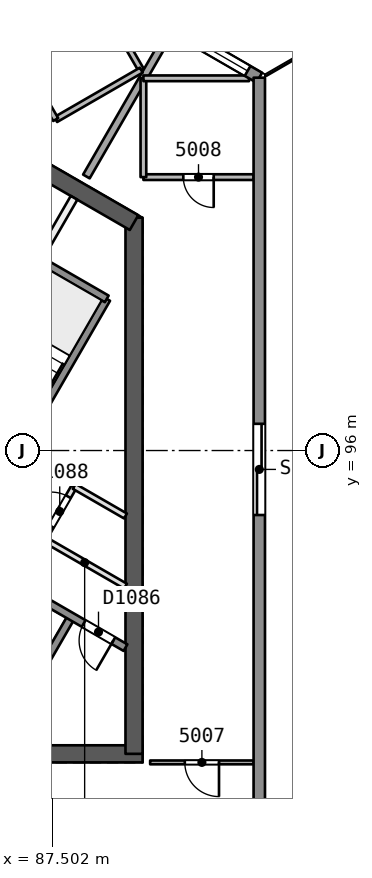
"""IFC4 building model, lengths in metres.
Left out: names, types, materials, properties, quantities, classifications, styles, units other than length and angle.
Written with IfcOpenShell. Run it as: python <this file> out.ifc"""

import sys

from ifc_helpers import new_model, si_unit, direction, frame, frame_2d, origin, place, context, subcontext, project, spatial, rectangle, extrude, element, fill, save


model = new_model("IFC4")
c1 = context("Model", 3, precision=1e-05, world=origin(), true_north=direction((0.0, 1.0)))
c2 = subcontext(c1, "Body", "Model", "MODEL_VIEW")
j1 = project(units=[si_unit("LENGTHUNIT", "METRE"), si_unit("PLANEANGLEUNIT", "RADIAN")], contexts=[c1])
p1 = place(None, origin())
s1 = spatial("IfcSite", under=j1, at=p1, CompositionType="ELEMENT")
p2 = place(p1, origin())
s2 = spatial("IfcBuilding", under=s1, at=p2, CompositionType="ELEMENT")
p3 = place(p2, frame((0.0, 0.0, 205.8)))
s3 = spatial("IfcBuildingStorey", under=s2, at=p3, CompositionType="ELEMENT", Elevation=205.8)
p4 = place(p3, frame((79.63, 88.019, 0.0), z_axis=(0.0, 0.0, 1.0), x_axis=(1.0, 0.0, 0.0)))
e1 = element("IfcWall", 1, at=p4, inside=s3, PredefinedType="SHEAR", context=c2, shape_type="SweptSolid", body=[
    extrude(rectangle(XDim=10.25, YDim=0.45, at=frame_2d((5.125, 0.0))), origin(), (0.0, 0.0, 1.0), 3.7),
])
p5 = place(p4, frame((0.82, 0.0, 0.0)))
e2 = element("IfcOpeningElement", 2, at=p5, cuts=e1, PredefinedType="OPENING", context=c2, shape_type="SweptSolid", body=[
    extrude(rectangle(XDim=1.2, YDim=2.1, at=frame_2d((0.6, 1.05))), frame((0.0, 0.235, 0.0), z_axis=(0.0, -1.0, 0.0), x_axis=(1.0, 0.0, 0.0)), (0.0, 0.0, 1.0), 0.471),
])
p6 = place(p3, frame((89.655, 88.019, 0.0), z_axis=(0.0, 0.0, 1.0), x_axis=(0.0, 1.0, 0.0)))
e3 = element("IfcWall", 3, at=p6, inside=s3, PredefinedType="SHEAR", context=c2, shape_type="SweptSolid", body=[
    extrude(rectangle(XDim=14.108, YDim=0.45, at=frame_2d((7.054, 0.0))), origin(), (0.0, 0.0, 1.0), 3.7),
])
p7 = place(p3, frame((89.655, 101.998, 0.0), z_axis=(0.0, 0.0, 1.0), x_axis=(-0.866042179588, 0.49997094233, 0.0)))
e4 = element("IfcWall", 4, at=p7, inside=s3, PredefinedType="SHEAR", context=c2, shape_type="SweptSolid", body=[
    extrude(rectangle(XDim=3.515, YDim=0.45, at=frame_2d((1.758, 0.0))), origin(), (0.0, 0.0, 1.0), 3.7),
])
p8 = place(p3, frame((92.802, 87.794, 0.0), z_axis=(0.0, 0.0, 1.0), x_axis=(-1.0, 0.0, 0.0)))
e5 = element("IfcWall", 5, at=p8, inside=s3, PredefinedType="PARTITIONING", context=c2, shape_type="SweptSolid", body=[
    extrude(rectangle(XDim=2.723, YDim=0.1, at=frame_2d((1.361, 0.0))), origin(), (0.0, 0.0, 1.0), 3.3),
])
p9 = place(p8, frame((0.911, 0.0, 0.0)))
e6 = element("IfcOpeningElement", 6, at=p9, cuts=e5, PredefinedType="OPENING", context=c2, shape_type="SweptSolid", body=[
    extrude(rectangle(XDim=0.9, YDim=2.1, at=frame_2d((0.45, 1.05))), frame((0.0, 0.061, 0.0), z_axis=(0.0, -1.0, 0.0), x_axis=(1.0, 0.0, 0.0)), (0.0, 0.0, 1.0), 0.121),
])
p10 = place(p3, frame((92.802, 103.194, 0.0), z_axis=(0.0, 0.0, 1.0), x_axis=(-1.0, 0.0, 0.0)))
e7 = element("IfcWall", 7, at=p10, inside=s3, PredefinedType="PARTITIONING", context=c2, shape_type="SweptSolid", body=[
    extrude(rectangle(XDim=2.9, YDim=0.15, at=frame_2d((1.45, 0.0))), origin(), (0.0, 0.0, 1.0), 3.3),
])
p11 = place(p10, frame((1.05, 0.0, 0.0)))
e8 = element("IfcOpeningElement", 8, at=p11, cuts=e7, PredefinedType="OPENING", context=c2, shape_type="SweptSolid", body=[
    extrude(rectangle(XDim=0.8, YDim=2.1, at=frame_2d((0.4, 1.05))), frame((0.0, 0.085, 0.0), z_axis=(0.0, -1.0, 0.0), x_axis=(1.0, 0.0, 0.0)), (0.0, 0.0, 1.0), 0.171),
])
p12 = place(p3, frame((89.902, 103.194, 0.0), z_axis=(0.0, 0.0, 1.0), x_axis=(0.0, 1.0, 0.0)))
e9 = element("IfcWall", 9, at=p12, inside=s3, PredefinedType="PARTITIONING", context=c2, shape_type="SweptSolid", body=[
    extrude(rectangle(XDim=2.6, YDim=0.15, at=frame_2d((1.3, 0.0))), origin(), (0.0, 0.0, 1.0), 3.3),
])
p13 = place(p3, frame((89.902, 105.794, 0.0), z_axis=(0.0, 0.0, 1.0), x_axis=(1.0, 0.0, 0.0)))
e10 = element("IfcWall", 10, at=p13, inside=s3, PredefinedType="PARTITIONING", context=c2, shape_type="SweptSolid", body=[
    extrude(rectangle(XDim=2.78, YDim=0.15, at=frame_2d((1.39, 0.0))), origin(), (0.0, 0.0, 1.0), 3.3),
])
p14 = place(p3, frame((90.59, 107.002, 0.0), z_axis=(0.0, 0.0, 1.0), x_axis=(-0.500002498361, -0.86602396135, 0.0)))
e11 = element("IfcWall", 11, at=p14, inside=s3, PredefinedType="PARTITIONING", context=c2, shape_type="SweptSolid", body=[
    extrude(rectangle(XDim=4.377, YDim=0.2, at=frame_2d((2.188, 0.0))), origin(), (0.0, 0.0, 1.0), 3.3),
])
p15 = place(p3, frame((88.613, 108.143, 0.0), z_axis=(0.0, 0.0, 1.0), x_axis=(0.500028332303, -0.866009045504, 0.0)))
e12 = element("IfcWall", 12, at=p15, inside=s3, PredefinedType="PARTITIONING", context=c2, shape_type="SweptSolid", body=[
    extrude(rectangle(XDim=2.464, YDim=0.15, at=frame_2d((1.232, 0.0))), origin(), (0.0, 0.0, 1.0), 3.3),
])
p16 = place(p3, frame((89.845, 106.009, 0.0), z_axis=(0.0, 0.0, 1.0), x_axis=(-0.865997922154, -0.500047596559, 0.0)))
e13 = element("IfcWall", 13, at=p16, inside=s3, PredefinedType="PARTITIONING", context=c2, shape_type="SweptSolid", body=[
    extrude(rectangle(XDim=2.6, YDim=0.15, at=frame_2d((1.3, 0.0))), origin(), (0.0, 0.0, 1.0), 3.3),
])
p17 = place(p3, frame((87.594, 104.709, 0.0), z_axis=(0.0, 0.0, 1.0), x_axis=(-0.500077242023, 0.865980803489, 0.0)))
e14 = element("IfcWall", 14, at=p17, inside=s3, PredefinedType="PARTITIONING", context=c2, shape_type="SweptSolid", body=[
    extrude(rectangle(XDim=2.7, YDim=0.15, at=frame_2d((1.35, 0.0))), origin(), (0.0, 0.0, 1.0), 3.3),
])
p18 = place(p17, frame((0.95, 0.0, 0.0)))
e15 = element("IfcOpeningElement", 15, at=p18, cuts=e14, PredefinedType="OPENING", context=c2, shape_type="SweptSolid", body=[
    extrude(rectangle(XDim=0.8, YDim=2.1, at=frame_2d((0.4, 1.05))), frame((0.0, 0.085, 0.0), z_axis=(0.0, -1.0, 0.0), x_axis=(1.0, 0.0, 0.0)), (0.0, 0.0, 1.0), 0.171),
])
p19 = place(p3, frame((88.377, 108.451, 0.0), z_axis=(0.0, 0.0, 1.0), x_axis=(0.866015446554, -0.500017246033, 0.0)))
e16 = element("IfcWall", 16, at=p19, inside=s3, PredefinedType="SOLIDWALL", context=c2, shape_type="SweptSolid", body=[
    extrude(rectangle(XDim=5.281, YDim=0.3, at=frame_2d((2.641, 0.0))), origin(), (0.0, 0.0, 1.0), 3.3),
])
p20 = place(p19, frame((3.126, 0.0, 0.9)))
e17 = element("IfcOpeningElement", 17, at=p20, cuts=e16, PredefinedType="OPENING", context=c2, shape_type="SweptSolid", body=[
    extrude(rectangle(XDim=1.8, YDim=1.5, at=frame_2d((0.9, 0.75))), frame((0.0, 0.161, 0.0), z_axis=(0.0, -1.0, 0.0), x_axis=(1.0, 0.0, 0.0)), (0.0, 0.0, 1.0), 0.321),
])
p21 = place(p19, frame((0.372, 0.0, 0.9)))
e18 = element("IfcOpeningElement", 18, at=p21, cuts=e16, PredefinedType="OPENING", context=c2, shape_type="SweptSolid", body=[
    extrude(rectangle(XDim=1.8, YDim=1.5, at=frame_2d((0.9, 0.75))), frame((0.0, 0.161, 0.0), z_axis=(0.0, -1.0, 0.0), x_axis=(1.0, 0.0, 0.0)), (0.0, 0.0, 1.0), 0.321),
])
p22 = place(p3, frame((92.951, 105.811, 0.0), z_axis=(0.0, 0.0, 1.0), x_axis=(0.0, -1.0, 0.0)))
e19 = element("IfcWall", 19, at=p22, inside=s3, PredefinedType="SOLIDWALL", context=c2, shape_type="SweptSolid", body=[
    extrude(rectangle(XDim=51.621, YDim=0.3, at=frame_2d((25.811, 0.0))), origin(), (0.0, 0.0, 1.0), 3.3),
])
p23 = place(p22, frame((24.299, 0.0, 0.0)))
e20 = element("IfcOpeningElement", 20, at=p23, cuts=e19, PredefinedType="OPENING", context=c2, shape_type="SweptSolid", body=[
    extrude(rectangle(XDim=2.4, YDim=2.4, at=frame_2d((1.2, 1.2))), frame((0.0, 0.161, 0.0), z_axis=(0.0, -1.0, 0.0), x_axis=(1.0, 0.0, 0.0)), (0.0, 0.0, 1.0), 0.321),
])
p24 = place(p22, frame((29.287, 0.0, 0.0)))
e21 = element("IfcOpeningElement", 21, at=p24, cuts=e19, PredefinedType="OPENING", context=c2, shape_type="SweptSolid", body=[
    extrude(rectangle(XDim=2.4, YDim=2.4, at=frame_2d((1.2, 1.2))), frame((0.0, 0.161, 0.0), z_axis=(0.0, -1.0, 0.0), x_axis=(1.0, 0.0, 0.0)), (0.0, 0.0, 1.0), 0.321),
])
p25 = place(p22, frame((40.147, 0.0, 0.0)))
e22 = element("IfcOpeningElement", 22, at=p25, cuts=e19, PredefinedType="OPENING", context=c2, shape_type="SweptSolid", body=[
    extrude(rectangle(XDim=2.4, YDim=2.4, at=frame_2d((1.2, 1.2))), frame((0.0, 0.161, 0.0), z_axis=(0.0, -1.0, 0.0), x_axis=(1.0, 0.0, 0.0)), (0.0, 0.0, 1.0), 0.321),
])
p26 = place(p22, frame((19.622, 0.0, 0.0)))
e23 = element("IfcOpeningElement", 23, at=p26, cuts=e19, PredefinedType="OPENING", context=c2, shape_type="SweptSolid", body=[
    extrude(rectangle(XDim=2.4, YDim=2.4, at=frame_2d((1.2, 1.2))), frame((0.0, 0.161, 0.0), z_axis=(0.0, -1.0, 0.0), x_axis=(1.0, 0.0, 0.0)), (0.0, 0.0, 1.0), 0.321),
])
p27 = place(p22, frame((9.107, 0.0, 0.0)))
e24 = element("IfcOpeningElement", 24, at=p27, cuts=e19, PredefinedType="OPENING", context=c2, shape_type="SweptSolid", body=[
    extrude(rectangle(XDim=2.4, YDim=2.4, at=frame_2d((1.2, 1.2))), frame((0.0, 0.161, 0.0), z_axis=(0.0, -1.0, 0.0), x_axis=(1.0, 0.0, 0.0)), (0.0, 0.0, 1.0), 0.321),
])
p28 = place(p3, frame((43.672, 82.641, 0.0), z_axis=(0.0, 0.0, 1.0), x_axis=(0.866024917385, 0.500000842468, 0.0)))
e25 = element("IfcWall", 25, at=p28, inside=s3, PredefinedType="SOLIDWALL", context=c2, shape_type="SweptSolid", body=[
    extrude(rectangle(XDim=51.621, YDim=0.3, at=frame_2d((25.811, 0.0))), origin(), (0.0, 0.0, 1.0), 3.3),
])
p29 = place(p28, frame((24.611, 0.0, 0.0)))
e26 = element("IfcOpeningElement", 26, at=p29, cuts=e25, PredefinedType="OPENING", context=c2, shape_type="SweptSolid", body=[
    extrude(rectangle(XDim=2.4, YDim=2.4, at=frame_2d((1.2, 1.2))), frame((0.0, 0.161, 0.0), z_axis=(0.0, -1.0, 0.0), x_axis=(1.0, 0.0, 0.0)), (0.0, 0.0, 1.0), 0.321),
])
p30 = place(p28, frame((30.378, 0.0, 0.0)))
e27 = element("IfcOpeningElement", 27, at=p30, cuts=e25, PredefinedType="OPENING", context=c2, shape_type="SweptSolid", body=[
    extrude(rectangle(XDim=2.4, YDim=2.4, at=frame_2d((1.2, 1.2))), frame((0.0, 0.161, 0.0), z_axis=(0.0, -1.0, 0.0), x_axis=(1.0, 0.0, 0.0)), (0.0, 0.0, 1.0), 0.321),
])
p31 = place(p28, frame((40.147, 0.0, 0.0)))
e28 = element("IfcOpeningElement", 28, at=p31, cuts=e25, PredefinedType="OPENING", context=c2, shape_type="SweptSolid", body=[
    extrude(rectangle(XDim=2.4, YDim=2.4, at=frame_2d((1.2, 1.2))), frame((0.0, 0.161, 0.0), z_axis=(0.0, -1.0, 0.0), x_axis=(1.0, 0.0, 0.0)), (0.0, 0.0, 1.0), 0.321),
])
p32 = place(p28, frame((18.843, 0.0, 0.0)))
e29 = element("IfcOpeningElement", 29, at=p32, cuts=e25, PredefinedType="OPENING", context=c2, shape_type="SweptSolid", body=[
    extrude(rectangle(XDim=2.4, YDim=2.4, at=frame_2d((1.2, 1.2))), frame((0.0, 0.161, 0.0), z_axis=(0.0, -1.0, 0.0), x_axis=(1.0, 0.0, 0.0)), (0.0, 0.0, 1.0), 0.321),
])
p33 = place(p28, frame((9.107, 0.0, 0.0)))
e30 = element("IfcOpeningElement", 30, at=p33, cuts=e25, PredefinedType="OPENING", context=c2, shape_type="SweptSolid", body=[
    extrude(rectangle(XDim=2.4, YDim=2.4, at=frame_2d((1.2, 1.2))), frame((0.0, 0.161, 0.0), z_axis=(0.0, -1.0, 0.0), x_axis=(1.0, 0.0, 0.0)), (0.0, 0.0, 1.0), 0.321),
])
p34 = place(p3, frame((86.77, 89.486, 0.0), z_axis=(0.0, 0.0, 1.0), x_axis=(0.499961042966, 0.86604789447, 0.0)))
e31 = element("IfcWall", 31, at=p34, inside=s3, PredefinedType="SOLIDWALL", context=c2, shape_type="SweptSolid", body=[
    extrude(rectangle(XDim=2.48, YDim=0.2, at=frame_2d((1.24, 0.0))), origin(), (0.0, 0.0, 1.0), 3.3),
])
p35 = place(p3, frame((87.281, 93.671, 0.0), z_axis=(0.0, 0.0, 1.0), x_axis=(0.499880961361, 0.866094119867, 0.0)))
e32 = element("IfcWall", 32, at=p35, inside=s3, PredefinedType="PARTITIONING", context=c2, shape_type="SweptSolid", body=[
    extrude(rectangle(XDim=1.6, YDim=0.15, at=frame_2d((0.8, 0.0))), origin(), (0.0, 0.0, 1.0), 3.3),
])
p36 = place(p35, frame((0.387, 0.0, 0.0)))
e33 = element("IfcOpeningElement", 33, at=p36, cuts=e32, PredefinedType="OPENING", context=c2, shape_type="SweptSolid", body=[
    extrude(rectangle(XDim=0.9, YDim=2.1, at=frame_2d((0.45, 1.05))), frame((0.0, 0.085, 0.0), z_axis=(0.0, -1.0, 0.0), x_axis=(1.0, 0.0, 0.0)), (0.0, 0.0, 1.0), 0.171),
])
p37 = place(p3, frame((85.087, 93.321, 0.0), z_axis=(0.0, 0.0, 1.0), x_axis=(0.500019787375, 0.866013979237, 0.0)))
e34 = element("IfcWall", 34, at=p37, inside=s3, PredefinedType="SOLIDWALL", context=c2, shape_type="SweptSolid", body=[
    extrude(rectangle(XDim=7.7, YDim=0.2, at=frame_2d((3.85, 0.0))), origin(), (0.0, 0.0, 1.0), 3.3),
])
p38 = place(p3, frame((87.09, 100.94, 0.0), z_axis=(0.0, 0.0, 1.0), x_axis=(0.500011643316, 0.866018681408, 0.0)))
e35 = element("IfcWall", 35, at=p38, inside=s3, PredefinedType="PARTITIONING", context=c2, shape_type="SweptSolid", body=[
    extrude(rectangle(XDim=1.973, YDim=0.2, at=frame_2d((0.987, 0.0))), origin(), (0.0, 0.0, 1.0), 3.3),
])
p39 = place(p3, frame((89.43, 90.814, 0.0), z_axis=(0.0, 0.0, 1.0), x_axis=(-0.866018983788, 0.500011119594, 0.0)))
e36 = element("IfcWall", 36, at=p39, inside=s3, PredefinedType="SOLIDWALL", context=c2, shape_type="SweptSolid", body=[
    extrude(rectangle(XDim=10.64, YDim=0.2, at=frame_2d((5.32, 0.0))), origin(), (0.0, 0.0, 1.0), 3.3),
])
p40 = place(p39, frame((0.37, 0.0, 0.0)))
e37 = element("IfcOpeningElement", 37, at=p40, cuts=e36, PredefinedType="OPENING", context=c2, shape_type="SweptSolid", body=[
    extrude(rectangle(XDim=0.9, YDim=2.1, at=frame_2d((0.45, 1.05))), frame((0.0, 0.11, 0.0), z_axis=(0.0, -1.0, 0.0), x_axis=(1.0, 0.0, 0.0)), (0.0, 0.0, 1.0), 0.221),
])
p41 = place(p3, frame((89.43, 92.43, 0.0), z_axis=(0.0, 0.0, 1.0), x_axis=(-0.866018462269, 0.500012022864, 0.0)))
e38 = element("IfcWall", 38, at=p41, inside=s3, PredefinedType="PARTITIONING", context=c2, shape_type="SweptSolid", body=[
    extrude(rectangle(XDim=2.481, YDim=0.15, at=frame_2d((1.241, 0.0))), origin(), (0.0, 0.0, 1.0), 3.3),
])
p42 = place(p3, frame((89.43, 94.278, 0.0), z_axis=(0.0, 0.0, 1.0), x_axis=(-0.86598723706, 0.500066100879, 0.0)))
e39 = element("IfcWall", 39, at=p42, inside=s3, PredefinedType="PARTITIONING", context=c2, shape_type="SweptSolid", body=[
    extrude(rectangle(XDim=1.558, YDim=0.15, at=frame_2d((0.779, 0.0))), origin(), (0.0, 0.0, 1.0), 3.3),
])
p43 = place(p3, frame((88.937, 99.99, 0.0), z_axis=(0.0, 0.0, 1.0), x_axis=(-0.866004344652, 0.500036473714, 0.0)))
e40 = element("IfcWall", 40, at=p43, inside=s3, PredefinedType="SOLIDWALL", context=c2, shape_type="SweptSolid", body=[
    extrude(rectangle(XDim=4.15, YDim=0.2, at=frame_2d((2.075, 0.0))), origin(), (0.0, 0.0, 1.0), 3.3),
])
p44 = place(p9, origin())
e41 = element("IfcDoor", 41, at=p44, inside=s3, OperationType="SINGLE_SWING_LEFT", PredefinedType="NOTDEFINED", context=c2, shape_type="SweptSolid", body=[
    extrude(rectangle(XDim=0.9, YDim=2.1, at=frame_2d((0.45, 1.05))), frame((0.0, 0.025, 0.0), z_axis=(0.0, -1.0, 0.0), x_axis=(1.0, 0.0, 0.0)), (0.0, 0.0, 1.0), 0.05),
])
fill(e6, e41)
p45 = place(p11, origin())
e42 = element("IfcDoor", 42, at=p45, inside=s3, OperationType="SINGLE_SWING_LEFT", PredefinedType="NOTDEFINED", context=c2, shape_type="SweptSolid", body=[
    extrude(rectangle(XDim=0.8, YDim=2.1, at=frame_2d((0.4, 1.05))), frame((0.0, 0.025, 0.0), z_axis=(0.0, -1.0, 0.0), x_axis=(1.0, 0.0, 0.0)), (0.0, 0.0, 1.0), 0.05),
])
fill(e8, e42)
p46 = place(p20, origin())
e43 = element("IfcWindow", 43, at=p46, inside=s3, PartitioningType="SINGLE_PANEL", PredefinedType="WINDOW", context=c2, shape_type="SweptSolid", body=[
    extrude(rectangle(XDim=1.8, YDim=1.5, at=frame_2d((0.9, 0.75))), frame((0.0, 0.03, 0.0), z_axis=(0.0, -1.0, 0.0), x_axis=(1.0, 0.0, 0.0)), (0.0, 0.0, 1.0), 0.06),
])
fill(e17, e43)
p47 = place(p27, origin())
e44 = element("IfcDoor", 44, at=p47, inside=s3, OperationType="SLIDING_TO_LEFT", PredefinedType="NOTDEFINED", context=c2, shape_type="SweptSolid", body=[
    extrude(rectangle(XDim=2.4, YDim=2.4, at=frame_2d((1.2, 1.2))), frame((0.0, 0.025, 0.0), z_axis=(0.0, -1.0, 0.0), x_axis=(1.0, 0.0, 0.0)), (0.0, 0.0, 1.0), 0.05),
])
fill(e24, e44)
p48 = place(p40, origin())
e45 = element("IfcDoor", 45, at=p48, inside=s3, OperationType="SINGLE_SWING_LEFT", PredefinedType="NOTDEFINED", context=c2, shape_type="SweptSolid", body=[
    extrude(rectangle(XDim=0.9, YDim=2.1, at=frame_2d((0.45, 1.05))), frame((0.0, 0.025, 0.0), z_axis=(0.0, -1.0, 0.0), x_axis=(1.0, 0.0, 0.0)), (0.0, 0.0, 1.0), 0.05),
])
fill(e37, e45)
p49 = place(p36, origin())
e46 = element("IfcDoor", 46, at=p49, inside=s3, OperationType="SINGLE_SWING_LEFT", PredefinedType="NOTDEFINED", context=c2, shape_type="SweptSolid", body=[
    extrude(rectangle(XDim=0.9, YDim=2.1, at=frame_2d((0.45, 1.05))), frame((0.0, 0.025, 0.0), z_axis=(0.0, -1.0, 0.0), x_axis=(1.0, 0.0, 0.0)), (0.0, 0.0, 1.0), 0.05),
])
fill(e33, e46)
save(model, sys.argv[1])
